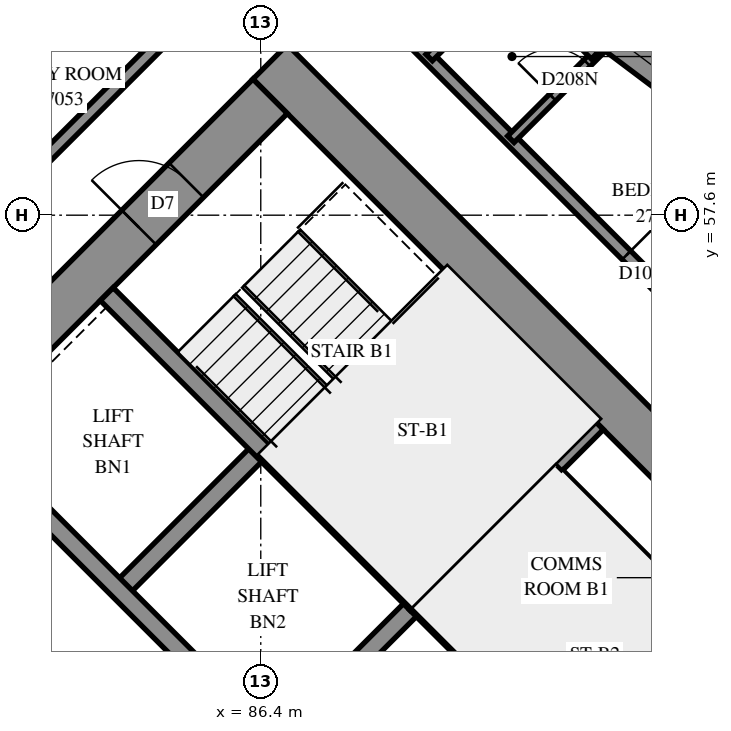
"""IFC4 building model, lengths in metres.
Left out: names, types, materials, properties, quantities, classifications, styles, units other than length and angle.
Written with IfcOpenShell. Run it as: python <this file> out.ifc"""

import sys

from ifc_helpers import new_model, si_unit, direction, frame, frame_2d, origin, place, context, subcontext, project, spatial, polyline, rectangle, outline, extrude, element, fill, save


model = new_model("IFC4")
c1 = context("Model", 3, precision=1e-05, world=origin(), true_north=direction((0.0, 1.0)))
c2 = subcontext(c1, "Body", "Model", "MODEL_VIEW")
j1 = project(units=[si_unit("LENGTHUNIT", "METRE"), si_unit("PLANEANGLEUNIT", "RADIAN")], contexts=[c1])
p1 = place(None, origin())
s1 = spatial("IfcSite", under=j1, at=p1, CompositionType="ELEMENT")
p2 = place(p1, origin())
s2 = spatial("IfcBuilding", under=s1, at=p2, CompositionType="ELEMENT")
p3 = place(p2, frame((0.0, 0.0, 101.6)))
s3 = spatial("IfcBuildingStorey", under=s2, at=p3, CompositionType="ELEMENT", Elevation=101.6)
p4 = place(p3, frame((86.554, 60.121, -0.3), z_axis=(0.0, 0.0, 1.0), x_axis=(0.7071067812, -0.7071067812, 0.0)))
e1 = element("IfcWall", 1, at=p4, inside=s3, PredefinedType="SHEAR", context=c2, shape_type="SweptSolid", body=[
    extrude(rectangle(XDim=16.0, YDim=0.8, at=frame_2d((8.0, 0.0))), origin(), (0.0, 0.0, 1.0), 2.7),
])
p5 = place(p4, frame((10.8, 0.0, 0.3)))
e2 = element("IfcOpeningElement", 2, at=p5, cuts=e1, PredefinedType="OPENING", context=c2, shape_type="SweptSolid", body=[
    extrude(rectangle(XDim=0.8, YDim=2.1, at=frame_2d((0.4, 1.05))), frame((0.0, 0.41, 0.0), z_axis=(0.0, -1.0, 0.0), x_axis=(1.0, 0.0, 0.0)), (0.0, 0.0, 1.0), 0.82),
])
p6 = place(p3, frame((76.372, 49.373, -0.3), z_axis=(0.0, 0.0, 1.0), x_axis=(0.7071067812, 0.7071067812, 0.0)))
e3 = element("IfcWall", 3, at=p6, inside=s3, PredefinedType="SHEAR", context=c2, shape_type="SweptSolid", body=[
    extrude(rectangle(XDim=14.4, YDim=0.8, at=frame_2d((7.2, 0.0))), origin(), (0.0, 0.0, 1.0), 2.7),
])
p7 = place(p6, frame((4.55, 0.0, 0.3)))
e4 = element("IfcOpeningElement", 4, at=p7, cuts=e3, PredefinedType="OPENING", context=c2, shape_type="SweptSolid", body=[
    extrude(rectangle(XDim=1.1, YDim=2.1, at=frame_2d((0.55, 1.05))), frame((0.0, 0.41, 0.0), z_axis=(0.0, -1.0, 0.0), x_axis=(1.0, 0.0, 0.0)), (0.0, 0.0, 1.0), 0.82),
])
p8 = place(p6, frame((11.35, 0.0, 0.3)))
e5 = element("IfcOpeningElement", 5, at=p8, cuts=e3, PredefinedType="OPENING", context=c2, shape_type="SweptSolid", body=[
    extrude(rectangle(XDim=1.1, YDim=2.1, at=frame_2d((0.55, 1.05))), frame((0.0, 0.41, 0.0), z_axis=(0.0, -1.0, 0.0), x_axis=(1.0, 0.0, 0.0)), (0.0, 0.0, 1.0), 0.82),
])
p9 = place(p3, frame((84.079, 51.423, 0.0), z_axis=(0.0, 0.0, 1.0), x_axis=(0.7071219326, 0.7070916295, 0.0)))
e6 = element("IfcWall", 6, at=p9, inside=s3, PredefinedType="SOLIDWALL", context=c2, shape_type="SweptSolid", body=[
    extrude(rectangle(XDim=3.3, YDim=0.3, at=frame_2d((1.65, 0.0))), origin(), (0.0, 0.0, 1.0), 3.1),
])
p10 = place(p3, frame((86.625, 48.878, 0.0), z_axis=(0.0, 0.0, 1.0), x_axis=(0.7071067812, 0.7071067812, 0.0)))
e7 = element("IfcWall", 7, at=p10, inside=s3, PredefinedType="SOLIDWALL", context=c2, shape_type="SweptSolid", body=[
    extrude(rectangle(XDim=3.3, YDim=0.3, at=frame_2d((1.65, 0.0))), origin(), (0.0, 0.0, 1.0), 3.1),
])
p11 = place(p3, frame((78.988, 51.423, 0.0), z_axis=(0.0, 0.0, 1.0), x_axis=(0.7071067812, -0.7071067812, 0.0)))
e8 = element("IfcWall", 8, at=p11, inside=s3, PredefinedType="SOLIDWALL", context=c2, shape_type="SweptSolid", body=[
    extrude(rectangle(XDim=14.4, YDim=0.3, at=frame_2d((7.2, 0.0))), origin(), (0.0, 0.0, 1.0), 3.1),
])
p12 = place(p11, frame((1.25, 0.0, 0.0)))
e9 = element("IfcOpeningElement", 9, at=p12, cuts=e8, PredefinedType="OPENING", context=c2, shape_type="SweptSolid", body=[
    extrude(rectangle(XDim=1.1, YDim=2.1, at=frame_2d((0.55, 1.05))), frame((0.0, 0.16, 0.0), z_axis=(0.0, -1.0, 0.0), x_axis=(1.0, 0.0, 0.0)), (0.0, 0.0, 1.0), 0.32),
])
p13 = place(p11, frame((4.85, 0.0, 0.0)))
e10 = element("IfcOpeningElement", 10, at=p13, cuts=e8, PredefinedType="OPENING", context=c2, shape_type="SweptSolid", body=[
    extrude(rectangle(XDim=1.1, YDim=2.1, at=frame_2d((0.55, 1.05))), frame((0.0, 0.16, 0.0), z_axis=(0.0, -1.0, 0.0), x_axis=(1.0, 0.0, 0.0)), (0.0, 0.0, 1.0), 0.32),
])
p14 = place(p11, frame((8.45, 0.0, 0.0)))
e11 = element("IfcOpeningElement", 11, at=p14, cuts=e8, PredefinedType="OPENING", context=c2, shape_type="SweptSolid", body=[
    extrude(rectangle(XDim=1.1, YDim=2.1, at=frame_2d((0.55, 1.05))), frame((0.0, 0.16, 0.0), z_axis=(0.0, -1.0, 0.0), x_axis=(1.0, 0.0, 0.0)), (0.0, 0.0, 1.0), 0.32),
])
p15 = place(p11, frame((12.05, 0.0, 0.0)))
e12 = element("IfcOpeningElement", 12, at=p15, cuts=e8, PredefinedType="OPENING", context=c2, shape_type="SweptSolid", body=[
    extrude(rectangle(XDim=1.1, YDim=2.1, at=frame_2d((0.55, 1.05))), frame((0.0, 0.16, 0.0), z_axis=(0.0, -1.0, 0.0), x_axis=(1.0, 0.0, 0.0)), (0.0, 0.0, 1.0), 0.32),
])
p16 = place(p3, frame((81.534, 53.969, 0.0), z_axis=(0.0, 0.0, 1.0), x_axis=(0.707103309, -0.7071102534, 0.0)))
e13 = element("IfcWall", 13, at=p16, inside=s3, PredefinedType="SOLIDWALL", context=c2, shape_type="SweptSolid", body=[
    extrude(rectangle(XDim=14.4, YDim=0.3, at=frame_2d((7.2, 0.0))), origin(), (0.0, 0.0, 1.0), 3.1),
])
p17 = place(p16, frame((12.05, 0.0, 0.0)))
e14 = element("IfcOpeningElement", 14, at=p17, cuts=e13, PredefinedType="OPENING", context=c2, shape_type="SweptSolid", body=[
    extrude(rectangle(XDim=1.1, YDim=2.1, at=frame_2d((0.55, 1.05))), frame((0.0, 0.16, 0.0), z_axis=(0.0, -1.0, 0.0), x_axis=(1.0, 0.0, 0.0)), (0.0, 0.0, 1.0), 0.32),
])
for number, where, z_axis, x_axis in (
    (15, (83.867, 56.302, 0.0), (0.0, 0.0, 1.0), (0.707, -0.707, 0.0)),
    (16, (88.958, 51.211, 0.0), (0.0, 0.0, 1.0), (0.707, -0.707, 0.0)),
):
    element("IfcWall", number, at=place(p3, frame(where, z_axis=z_axis, x_axis=x_axis)), inside=s3, PredefinedType="SOLIDWALL", context=c2, shape_type="SweptSolid", body=[
        extrude(rectangle(XDim=7.2, YDim=0.3, at=frame_2d((3.6, 0.0))), origin(), (0.0, 0.0, 1.0), 3.1),
    ])
p18 = place(p3, frame((88.958, 51.211, 0.0), z_axis=(0.0, 0.0, 1.0), x_axis=(0.7071067812, 0.7071067812, 0.0)))
e17 = element("IfcWall", 17, at=p18, inside=s3, PredefinedType="SOLIDWALL", context=c2, shape_type="SweptSolid", body=[
    extrude(rectangle(XDim=4.2, YDim=0.3, at=frame_2d((2.1, 0.0))), origin(), (0.0, 0.0, 1.0), 3.1),
])
p19 = place(p3, frame((93.994, 59.192, 0.0), z_axis=(0.0, 0.0, 1.0), x_axis=(-0.7990967254, 0.6012024813, 0.0)))
e18 = element("IfcWall", 18, at=p19, inside=s3, PredefinedType="SOLIDWALL", context=c2, shape_type="SweptSolid", body=[
    extrude(outline(polyline([(-0.039, -0.275), (3.405, -0.275), (3.483, 0.275), (0.039, 0.275), (-0.039, -0.275)])), origin(), (0.0, 0.0, 1.0), 3.1),
])
p20 = place(p19, frame((0.938, 0.0, 0.5)))
e19 = element("IfcOpeningElement", 19, at=p20, cuts=e18, PredefinedType="OPENING", context=c2, shape_type="SweptSolid", body=[
    extrude(rectangle(XDim=1.2, YDim=2.45, at=frame_2d((0.6, 1.225))), frame((0.0, 0.285, 0.0), z_axis=(0.0, -1.0, 0.0), x_axis=(1.0, 0.0, 0.0)), (0.0, 0.0, 1.0), 0.57),
])
p21 = place(p3, frame((91.313, 53.354, 0.0), z_axis=(0.0, 0.0, 1.0), x_axis=(0.7071067812, -0.7071067812, 0.0)))
e20 = element("IfcWall", 20, at=p21, inside=s3, PredefinedType="PARTITIONING", context=c2, shape_type="SweptSolid", body=[
    extrude(rectangle(XDim=5.95, YDim=0.15, at=frame_2d((2.975, 0.0))), origin(), (0.0, 0.0, 1.0), 3.1),
])
p22 = place(p3, frame((87.894, 61.461, 0.0), z_axis=(0.0, 0.0, 1.0), x_axis=(0.7071067812, -0.7071067812, 0.0)))
e21 = element("IfcWall", 21, at=p22, inside=s3, PredefinedType="PARTITIONING", context=c2, shape_type="SweptSolid", body=[
    extrude(rectangle(XDim=10.428, YDim=0.2, at=frame_2d((5.214, 0.0))), origin(), (0.0, 0.0, 1.0), 3.1),
])
p23 = place(p22, frame((6.39, 0.0, 0.0)))
e22 = element("IfcOpeningElement", 22, at=p23, cuts=e21, PredefinedType="OPENING", context=c2, shape_type="SweptSolid", body=[
    extrude(rectangle(XDim=0.9, YDim=2.1, at=frame_2d((0.45, 1.05))), frame((0.0, 0.11, 0.0), z_axis=(0.0, -1.0, 0.0), x_axis=(1.0, 0.0, 0.0)), (0.0, 0.0, 1.0), 0.22),
])
p24 = place(p3, frame((80.949, 58.477, 0.0), z_axis=(0.0, 0.0, 1.0), x_axis=(0.7071122255, 0.7071013368, 0.0)))
e23 = element("IfcWall", 23, at=p24, inside=s3, PredefinedType="PARTITIONING", context=c2, shape_type="SweptSolid", body=[
    extrude(rectangle(XDim=9.184, YDim=0.2, at=frame_2d((4.592, 0.0))), origin(), (0.0, 0.0, 1.0), 3.1),
])
p25 = place(p3, frame((80.951, 56.641, 0.0), z_axis=(0.0, 0.0, 1.0), x_axis=(0.7071067812, 0.7071067812, 0.0)))
e24 = element("IfcWall", 24, at=p25, inside=s3, PredefinedType="PARTITIONING", context=c2, shape_type="SweptSolid", body=[
    extrude(rectangle(XDim=8.321, YDim=0.2, at=frame_2d((4.161, 0.0))), origin(), (0.0, 0.0, 1.0), 3.1),
])
p26 = place(p25, frame((0.816, 0.0, 0.0)))
e25 = element("IfcOpeningElement", 25, at=p26, cuts=e24, PredefinedType="OPENING", context=c2, shape_type="SweptSolid", body=[
    extrude(rectangle(XDim=1.0, YDim=2.1, at=frame_2d((0.5, 1.05))), frame((0.0, 0.11, 0.0), z_axis=(0.0, -1.0, 0.0), x_axis=(1.0, 0.0, 0.0)), (0.0, 0.0, 1.0), 0.22),
])
p27 = place(p3, frame((90.513, 58.849, 0.0), z_axis=(0.0, 0.0, 1.0), x_axis=(0.7071067812, 0.7071067812, 0.0)))
e26 = element("IfcWall", 26, at=p27, inside=s3, PredefinedType="PARTITIONING", context=c2, shape_type="SweptSolid", body=[
    extrude(rectangle(XDim=2.113, YDim=0.15, at=frame_2d((1.056, 0.0))), origin(), (0.0, 0.0, 1.0), 3.1),
])
p28 = place(p27, frame((0.972, 0.0, 0.0)))
e27 = element("IfcOpeningElement", 27, at=p28, cuts=e26, PredefinedType="OPENING", context=c2, shape_type="SweptSolid", body=[
    extrude(rectangle(XDim=0.8, YDim=2.1, at=frame_2d((0.4, 1.05))), frame((0.0, 0.085, 0.0), z_axis=(0.0, -1.0, 0.0), x_axis=(1.0, 0.0, 0.0)), (0.0, 0.0, 1.0), 0.17),
])
p29 = place(p3, frame((89.169, 60.193, 0.0), z_axis=(0.0, 0.0, 1.0), x_axis=(0.7076447093, 0.7065684436, 0.0)))
e28 = element("IfcWall", 28, at=p29, inside=s3, PredefinedType="PARTITIONING", context=c2, shape_type="SweptSolid", body=[
    extrude(rectangle(XDim=2.044, YDim=0.15, at=frame_2d((1.022, 0.0))), origin(), (0.0, 0.0, 1.0), 3.1),
])
p30 = place(p3, frame((91.085, 61.027, 0.0), z_axis=(0.0, 0.0, 1.0), x_axis=(0.7070628028, -0.7071507569, 0.0)))
e29 = element("IfcWall", 29, at=p30, inside=s3, PredefinedType="PARTITIONING", context=c2, shape_type="SweptSolid", body=[
    extrude(rectangle(XDim=1.137, YDim=0.15, at=frame_2d((0.569, 0.0))), origin(), (0.0, 0.0, 1.0), 3.1),
])
p31 = place(p20, origin())
e30 = element("IfcWindow", 30, at=p31, inside=s3, PartitioningType="SINGLE_PANEL", PredefinedType="WINDOW", context=c2, shape_type="SweptSolid", body=[
    extrude(rectangle(XDim=1.2, YDim=2.45, at=frame_2d((0.6, 1.225))), frame((0.0, 0.155, 0.0), z_axis=(0.0, -1.0, 0.0), x_axis=(1.0, 0.0, 0.0)), (0.0, 0.0, 1.0), 0.06),
])
fill(e19, e30)
p32 = place(p8, origin())
e31 = element("IfcDoor", 31, at=p32, inside=s3, OperationType="SINGLE_SWING_LEFT", PredefinedType="DOOR", context=c2, shape_type="SweptSolid", body=[
    extrude(rectangle(XDim=1.1, YDim=2.1, at=frame_2d((0.55, 1.05))), frame((0.0, 0.025, 0.0), z_axis=(0.0, -1.0, 0.0), x_axis=(1.0, 0.0, 0.0)), (0.0, 0.0, 1.0), 0.05),
])
fill(e5, e31)
p33 = place(p23, origin())
e32 = element("IfcDoor", 32, at=p33, inside=s3, OperationType="SINGLE_SWING_LEFT", PredefinedType="DOOR", context=c2, shape_type="SweptSolid", body=[
    extrude(rectangle(XDim=0.9, YDim=2.1, at=frame_2d((0.45, 1.05))), frame((0.0, 0.025, 0.0), z_axis=(0.0, -1.0, 0.0), x_axis=(1.0, 0.0, 0.0)), (0.0, 0.0, 1.0), 0.05),
])
fill(e22, e32)
p34 = place(p28, origin())
e33 = element("IfcDoor", 33, at=p34, inside=s3, OperationType="SINGLE_SWING_RIGHT", PredefinedType="DOOR", context=c2, shape_type="SweptSolid", body=[
    extrude(rectangle(XDim=0.8, YDim=2.1, at=frame_2d((0.4, 1.05))), frame((0.0, 0.025, 0.0), z_axis=(0.0, -1.0, 0.0), x_axis=(1.0, 0.0, 0.0)), (0.0, 0.0, 1.0), 0.05),
])
fill(e27, e33)
save(model, sys.argv[1])
